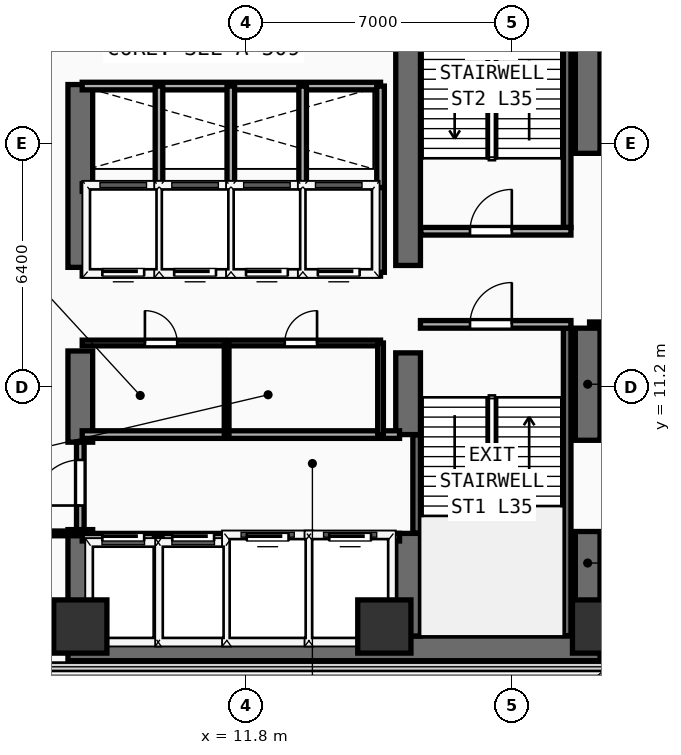
"""IFC4 building model, lengths in metres.
Left out: names, types, materials, properties, quantities, classifications, styles, units other than length and angle.
Written with IfcOpenShell. Run it as: python <this file> out.ifc"""

import sys

from ifc_helpers import new_model, si_unit, direction, frame, frame_2d, origin, origin_2d, place, context, subcontext, project, spatial, rectangle, extrude, element, fill, save


model = new_model("IFC4")
c1 = context("Model", 3, precision=1e-05, world=origin(), true_north=direction((0.0, 1.0)))
c2 = subcontext(c1, "Body", "Model", "MODEL_VIEW")
j1 = project(units=[si_unit("LENGTHUNIT", "METRE"), si_unit("PLANEANGLEUNIT", "RADIAN")], contexts=[c1])
p1 = place(None, origin())
s1 = spatial("IfcSite", under=j1, at=p1, CompositionType="ELEMENT")
p2 = place(p1, origin())
s2 = spatial("IfcBuilding", under=s1, at=p2, CompositionType="ELEMENT")
p3 = place(p2, frame((0.0, 0.0, 137.3)))
s3 = spatial("IfcBuildingStorey", under=s2, at=p3, CompositionType="ELEMENT", Elevation=137.3)
p4 = place(p3, frame((7.125, 4.325, 0.0), z_axis=(0.0, 0.0, 1.0), x_axis=(1.0, 0.0, 0.0)))
e1 = element("IfcWall", 1, at=p4, inside=s3, PredefinedType="SHEAR", context=c2, shape_type="SweptSolid", body=[
    extrude(rectangle(XDim=14.0, YDim=0.65, at=frame_2d((7.0, 0.0))), origin(), (0.0, 0.0, 1.0), 3.42),
])
p5 = place(p3, frame((7.45, 4.65, 0.0), z_axis=(0.0, 0.0, 1.0), x_axis=(0.0, 1.0, 0.0)))
e2 = element("IfcWall", 2, at=p5, inside=s3, PredefinedType="SHEAR", context=c2, shape_type="SweptSolid", body=[
    extrude(rectangle(XDim=2.8, YDim=0.65, at=frame_2d((1.4, 0.0))), origin(), (0.0, 0.0, 1.0), 3.42),
])
p6 = place(p3, frame((7.45, 9.75, 0.0), z_axis=(0.0, 0.0, 1.0), x_axis=(0.0, 1.0, 0.0)))
e3 = element("IfcWall", 3, at=p6, inside=s3, PredefinedType="SHEAR", context=c2, shape_type="SweptSolid", body=[
    extrude(rectangle(XDim=2.4, YDim=0.65, at=frame_2d((1.2, 0.0))), origin(), (0.0, 0.0, 1.0), 3.42),
])
p7 = place(p3, frame((7.45, 14.35, 0.0), z_axis=(0.0, 0.0, 1.0), x_axis=(0.0, 1.0, 0.0)))
e4 = element("IfcWall", 4, at=p7, inside=s3, PredefinedType="SHEAR", context=c2, shape_type="SweptSolid", body=[
    extrude(rectangle(XDim=4.81, YDim=0.65, at=frame_2d((2.405, 0.0))), origin(), (0.0, 0.0, 1.0), 3.42),
])
p8 = place(p3, frame((20.8, 4.65, 0.0), z_axis=(0.0, 0.0, 1.0), x_axis=(0.0, 1.0, 0.0)))
e5 = element("IfcWall", 5, at=p8, inside=s3, PredefinedType="SHEAR", context=c2, shape_type="SweptSolid", body=[
    extrude(rectangle(XDim=2.75, YDim=0.65, at=frame_2d((1.375, 0.0))), origin(), (0.0, 0.0, 1.0), 3.42),
])
p9 = place(p3, frame((20.8, 9.8, 0.0), z_axis=(0.0, 0.0, 1.0), x_axis=(0.0, 1.0, 0.0)))
e6 = element("IfcWall", 6, at=p9, inside=s3, PredefinedType="SHEAR", context=c2, shape_type="SweptSolid", body=[
    extrude(rectangle(XDim=2.95, YDim=0.65, at=frame_2d((1.475, 0.0))), origin(), (0.0, 0.0, 1.0), 3.42),
])
p10 = place(p3, frame((20.8, 17.35, 0.0), z_axis=(0.0, 0.0, 1.0), x_axis=(0.0, 1.0, 0.0)))
e7 = element("IfcWall", 7, at=p10, inside=s3, PredefinedType="SHEAR", context=c2, shape_type="SweptSolid", body=[
    extrude(rectangle(XDim=6.15, YDim=0.65, at=frame_2d((3.075, 0.0))), origin(), (0.0, 0.0, 1.0), 3.42),
])
p11 = place(p3, frame((16.075, 4.65, 0.0), z_axis=(0.0, 0.0, 1.0), x_axis=(0.0, 1.0, 0.0)))
e8 = element("IfcWall", 8, at=p11, inside=s3, PredefinedType="SHEAR", context=c2, shape_type="SweptSolid", body=[
    extrude(rectangle(XDim=2.7, YDim=0.65, at=frame_2d((1.35, 0.0))), origin(), (0.0, 0.0, 1.0), 3.42),
])
p12 = place(p3, frame((16.075, 9.95, 0.0), z_axis=(0.0, 0.0, 1.0), x_axis=(0.0, 1.0, 0.0)))
e9 = element("IfcWall", 9, at=p12, inside=s3, PredefinedType="SHEAR", context=c2, shape_type="SweptSolid", body=[
    extrude(rectangle(XDim=2.15, YDim=0.65, at=frame_2d((1.075, 0.0))), origin(), (0.0, 0.0, 1.0), 3.42),
])
p13 = place(p3, frame((16.075, 14.4, 0.0), z_axis=(0.0, 0.0, 1.0), x_axis=(0.0, 1.0, 0.0)))
e10 = element("IfcWall", 10, at=p13, inside=s3, PredefinedType="SHEAR", context=c2, shape_type="SweptSolid", body=[
    extrude(rectangle(XDim=9.1, YDim=0.65, at=frame_2d((4.55, 0.0))), origin(), (0.0, 0.0, 1.0), 3.42),
])
for number, where, z_axis, x_axis in (
    (11, (7.45, 4.9, 0.0), (0.0, 0.0, 1.0), (1.0, 0.0, 0.0)),
    (12, (15.45, 4.9, 0.0), (0.0, 0.0, 1.0), (1.0, 0.0, 0.0)),
    (13, (21.1, 4.9, 0.0), (0.0, 0.0, 1.0), (1.0, 0.0, 0.0)),
):
    element("IfcColumn", number, at=place(p3, frame(where, z_axis=z_axis, x_axis=x_axis)), inside=s3, PredefinedType="COLUMN", context=c2, shape_type="SweptSolid", body=[
        extrude(rectangle(XDim=1.4, YDim=1.4, at=origin_2d()), origin(), (0.0, 0.0, 1.0), 3.42),
    ])
p14 = place(p3, frame((16.3, 7.36, 0.0), z_axis=(0.0, 0.0, 1.0), x_axis=(0.0, 1.0, 0.0)))
e14 = element("IfcWall", 14, at=p14, inside=s3, PredefinedType="SHEAR", context=c2, shape_type="SweptSolid", body=[
    extrude(rectangle(XDim=2.58, YDim=0.2, at=frame_2d((1.29, 0.0))), origin(), (0.0, 0.0, 1.0), 3.42),
])
p15 = place(p3, frame((20.26, 4.66, 0.0), z_axis=(0.0, 0.0, 1.0), x_axis=(0.0, 1.0, 0.0)))
e15 = element("IfcWall", 15, at=p15, inside=s3, PredefinedType="SHEAR", context=c2, shape_type="SweptSolid", body=[
    extrude(rectangle(XDim=8.09, YDim=0.2, at=frame_2d((4.045, 0.0))), origin(), (0.0, 0.0, 1.0), 3.42),
])
p16 = place(p3, frame((16.4, 12.85, 0.0), z_axis=(0.0, 0.0, 1.0), x_axis=(1.0, 0.0, 0.0)))
e16 = element("IfcWall", 16, at=p16, inside=s3, PredefinedType="PARTITIONING", context=c2, shape_type="SweptSolid", body=[
    extrude(rectangle(XDim=3.96, YDim=0.2, at=frame_2d((1.98, 0.0))), origin(), (0.0, 0.0, 1.0), 3.42),
])
p17 = place(p16, frame((1.304, 0.0, 0.0)))
e17 = element("IfcOpeningElement", 17, at=p17, cuts=e16, PredefinedType="OPENING", context=c2, shape_type="SweptSolid", body=[
    extrude(rectangle(XDim=1.1, YDim=2.2, at=frame_2d((0.55, 1.1))), frame((0.0, 0.11, 0.0), z_axis=(0.0, -1.0, 0.0), x_axis=(1.0, 0.0, 0.0)), (0.0, 0.0, 1.0), 0.22),
])
p18 = place(p3, frame((20.26, 15.4, 0.0), z_axis=(0.0, 0.0, 1.0), x_axis=(0.0, 1.0, 0.0)))
e18 = element("IfcWall", 18, at=p18, inside=s3, PredefinedType="SHEAR", context=c2, shape_type="SweptSolid", body=[
    extrude(rectangle(XDim=8.09, YDim=0.2, at=frame_2d((4.045, 0.0))), origin(), (0.0, 0.0, 1.0), 3.42),
])
p19 = place(p3, frame((16.41, 15.3, 0.0), z_axis=(0.0, 0.0, 1.0), x_axis=(1.0, 0.0, 0.0)))
e19 = element("IfcWall", 19, at=p19, inside=s3, PredefinedType="PARTITIONING", context=c2, shape_type="SweptSolid", body=[
    extrude(rectangle(XDim=3.95, YDim=0.2, at=frame_2d((1.975, 0.0))), origin(), (0.0, 0.0, 1.0), 3.42),
])
p20 = place(p19, frame((1.294, 0.0, 0.0)))
e20 = element("IfcOpeningElement", 20, at=p20, cuts=e19, PredefinedType="OPENING", context=c2, shape_type="SweptSolid", body=[
    extrude(rectangle(XDim=1.1, YDim=2.2, at=frame_2d((0.55, 1.1))), frame((0.0, 0.11, 0.0), z_axis=(0.0, -1.0, 0.0), x_axis=(1.0, 0.0, 0.0)), (0.0, 0.0, 1.0), 0.22),
])
p21 = place(p3, frame((7.5, 7.25, 0.0), z_axis=(0.0, 0.0, 1.0), x_axis=(1.0, 0.0, 0.0)))
e21 = element("IfcWall", 21, at=p21, inside=s3, PredefinedType="PARTITIONING", context=c2, shape_type="SweptSolid", body=[
    extrude(rectangle(XDim=8.35, YDim=0.2, at=frame_2d((4.175, 0.0))), origin(), (0.0, 0.0, 1.0), 3.42),
])
p22 = place(p21, frame((0.53, 0.0, 0.0)))
e22 = element("IfcOpeningElement", 22, at=p22, cuts=e21, PredefinedType="OPENING", context=c2, shape_type="SweptSolid", body=[
    extrude(rectangle(XDim=1.1, YDim=2.2, at=frame_2d((0.55, 1.1))), frame((0.0, 0.11, 0.0), z_axis=(0.0, -1.0, 0.0), x_axis=(1.0, 0.0, 0.0)), (0.0, 0.0, 1.0), 0.22),
])
p23 = place(p21, frame((2.37, 0.0, 0.0)))
e23 = element("IfcOpeningElement", 23, at=p23, cuts=e21, PredefinedType="OPENING", context=c2, shape_type="SweptSolid", body=[
    extrude(rectangle(XDim=1.1, YDim=2.2, at=frame_2d((0.55, 1.1))), frame((0.0, 0.11, 0.0), z_axis=(0.0, -1.0, 0.0), x_axis=(1.0, 0.0, 0.0)), (0.0, 0.0, 1.0), 0.22),
])
p24 = place(p21, frame((4.33, 0.0, 0.0)))
e24 = element("IfcOpeningElement", 24, at=p24, cuts=e21, PredefinedType="OPENING", context=c2, shape_type="SweptSolid", body=[
    extrude(rectangle(XDim=1.1, YDim=2.2, at=frame_2d((0.55, 1.1))), frame((0.0, 0.11, 0.0), z_axis=(0.0, -1.0, 0.0), x_axis=(1.0, 0.0, 0.0)), (0.0, 0.0, 1.0), 0.22),
])
p25 = place(p21, frame((6.5, 0.0, 0.0)))
e25 = element("IfcOpeningElement", 25, at=p25, cuts=e21, PredefinedType="OPENING", context=c2, shape_type="SweptSolid", body=[
    extrude(rectangle(XDim=1.1, YDim=2.2, at=frame_2d((0.55, 1.1))), frame((0.0, 0.11, 0.0), z_axis=(0.0, -1.0, 0.0), x_axis=(1.0, 0.0, 0.0)), (0.0, 0.0, 1.0), 0.22),
])
p26 = place(p3, frame((7.5, 9.95, 0.0), z_axis=(0.0, 0.0, 1.0), x_axis=(1.0, 0.0, 0.0)))
e26 = element("IfcWall", 26, at=p26, inside=s3, PredefinedType="PARTITIONING", context=c2, shape_type="SweptSolid", body=[
    extrude(rectangle(XDim=8.35, YDim=0.2, at=frame_2d((4.175, 0.0))), origin(), (0.0, 0.0, 1.0), 3.42),
])
for number, where, z_axis, x_axis in (
    (27, (9.5, 4.45, 0.0), (0.0, 0.0, 1.0), (0.0, 1.0, 0.0)),
    (28, (11.36, 4.45, 0.0), (0.0, 0.0, 1.0), (0.0, 1.0, 0.0)),
    (29, (13.46, 4.45, 0.0), (0.0, 0.0, 1.0), (0.0, 1.0, 0.0)),
):
    element("IfcWall", number, at=place(p3, frame(where, z_axis=z_axis, x_axis=x_axis)), inside=s3, PredefinedType="PARTITIONING", context=c2, shape_type="SweptSolid", body=[
        extrude(rectangle(XDim=2.8, YDim=0.2, at=frame_2d((1.4, 0.0))), origin(), (0.0, 0.0, 1.0), 3.42),
    ])
p27 = place(p3, frame((7.45, 7.45, 0.0), z_axis=(0.0, 0.0, 1.0), x_axis=(0.0, 1.0, 0.0)))
e30 = element("IfcWall", 30, at=p27, inside=s3, PredefinedType="PARTITIONING", context=c2, shape_type="SweptSolid", body=[
    extrude(rectangle(XDim=2.3, YDim=0.2, at=frame_2d((1.15, 0.0))), origin(), (0.0, 0.0, 1.0), 2.4),
])
p28 = place(p27, frame((0.633, 0.0, 0.0)))
e31 = element("IfcOpeningElement", 31, at=p28, cuts=e30, PredefinedType="OPENING", context=c2, shape_type="SweptSolid", body=[
    extrude(rectangle(XDim=1.2, YDim=2.25, at=frame_2d((0.6, 1.125))), frame((0.0, 0.11, 0.0), z_axis=(0.0, -1.0, 0.0), x_axis=(1.0, 0.0, 0.0)), (0.0, 0.0, 1.0), 0.22),
])
p29 = place(p3, frame((7.5, 12.36, 0.0), z_axis=(0.0, 0.0, 1.0), x_axis=(1.0, 0.0, 0.0)))
e32 = element("IfcWall", 32, at=p29, inside=s3, PredefinedType="PARTITIONING", context=c2, shape_type="SweptSolid", body=[
    extrude(rectangle(XDim=7.85, YDim=0.15, at=frame_2d((3.925, 0.0))), origin(), (0.0, 0.0, 1.0), 3.42),
])
p30 = place(p29, frame((1.65, 0.0, 0.0)))
e33 = element("IfcOpeningElement", 33, at=p30, cuts=e32, PredefinedType="OPENING", context=c2, shape_type="SweptSolid", body=[
    extrude(rectangle(XDim=0.85, YDim=2.15, at=frame_2d((0.425, 1.075))), frame((0.0, 0.085, 0.0), z_axis=(0.0, -1.0, 0.0), x_axis=(1.0, 0.0, 0.0)), (0.0, 0.0, 1.0), 0.17),
])
p31 = place(p29, frame((5.329, 0.0, 0.0)))
e34 = element("IfcOpeningElement", 34, at=p31, cuts=e32, PredefinedType="OPENING", context=c2, shape_type="SweptSolid", body=[
    extrude(rectangle(XDim=0.85, YDim=2.15, at=frame_2d((0.425, 1.075))), frame((0.0, 0.085, 0.0), z_axis=(0.0, -1.0, 0.0), x_axis=(1.0, 0.0, 0.0)), (0.0, 0.0, 1.0), 0.17),
])
p32 = place(p3, frame((15.35, 9.95, 0.0), z_axis=(0.0, 0.0, 1.0), x_axis=(0.0, 1.0, 0.0)))
e35 = element("IfcWall", 35, at=p32, inside=s3, PredefinedType="PARTITIONING", context=c2, shape_type="SweptSolid", body=[
    extrude(rectangle(XDim=2.41, YDim=0.15, at=frame_2d((1.205, 0.0))), origin(), (0.0, 0.0, 1.0), 3.42),
])
p33 = place(p3, frame((11.3, 9.95, 0.0), z_axis=(0.0, 0.0, 1.0), x_axis=(0.0, 1.0, 0.0)))
e36 = element("IfcWall", 36, at=p33, inside=s3, PredefinedType="PARTITIONING", context=c2, shape_type="SweptSolid", body=[
    extrude(rectangle(XDim=2.41, YDim=0.125, at=frame_2d((1.205, 0.0))), origin(), (0.0, 0.0, 1.0), 3.42),
])
p34 = place(p3, frame((7.5, 14.22, 0.0), z_axis=(0.0, 0.0, 1.0), x_axis=(1.0, 0.0, 0.0)))
e37 = element("IfcWall", 37, at=p34, inside=s3, PredefinedType="PARTITIONING", context=c2, shape_type="SweptSolid", body=[
    extrude(rectangle(XDim=7.85, YDim=0.2, at=frame_2d((3.925, 0.0))), origin(), (0.0, 0.0, 1.0), 3.42),
])
p35 = place(p34, frame((0.53, 0.0, 0.0)))
e38 = element("IfcOpeningElement", 38, at=p35, cuts=e37, PredefinedType="OPENING", context=c2, shape_type="SweptSolid", body=[
    extrude(rectangle(XDim=1.1, YDim=2.2, at=frame_2d((0.55, 1.1))), frame((0.0, 0.11, 0.0), z_axis=(0.0, -1.0, 0.0), x_axis=(1.0, 0.0, 0.0)), (0.0, 0.0, 1.0), 0.22),
])
p36 = place(p34, frame((2.42, 0.0, 0.0)))
e39 = element("IfcOpeningElement", 39, at=p36, cuts=e37, PredefinedType="OPENING", context=c2, shape_type="SweptSolid", body=[
    extrude(rectangle(XDim=1.1, YDim=2.2, at=frame_2d((0.55, 1.1))), frame((0.0, 0.11, 0.0), z_axis=(0.0, -1.0, 0.0), x_axis=(1.0, 0.0, 0.0)), (0.0, 0.0, 1.0), 0.22),
])
p37 = place(p34, frame((4.31, 0.0, 0.0)))
e40 = element("IfcOpeningElement", 40, at=p37, cuts=e37, PredefinedType="OPENING", context=c2, shape_type="SweptSolid", body=[
    extrude(rectangle(XDim=1.1, YDim=2.2, at=frame_2d((0.55, 1.1))), frame((0.0, 0.11, 0.0), z_axis=(0.0, -1.0, 0.0), x_axis=(1.0, 0.0, 0.0)), (0.0, 0.0, 1.0), 0.22),
])
p38 = place(p34, frame((6.2, 0.0, 0.0)))
e41 = element("IfcOpeningElement", 41, at=p38, cuts=e37, PredefinedType="OPENING", context=c2, shape_type="SweptSolid", body=[
    extrude(rectangle(XDim=1.1, YDim=2.2, at=frame_2d((0.55, 1.1))), frame((0.0, 0.11, 0.0), z_axis=(0.0, -1.0, 0.0), x_axis=(1.0, 0.0, 0.0)), (0.0, 0.0, 1.0), 0.22),
])
p39 = place(p3, frame((7.5, 16.45, 0.0), z_axis=(0.0, 0.0, 1.0), x_axis=(1.0, 0.0, 0.0)))
e42 = element("IfcWall", 42, at=p39, inside=s3, PredefinedType="PARTITIONING", context=c2, shape_type="SweptSolid", body=[
    extrude(rectangle(XDim=7.85, YDim=0.2, at=frame_2d((3.925, 0.0))), origin(), (0.0, 0.0, 1.0), 3.42),
])
for number, where, z_axis, x_axis in (
    (43, (15.35, 14.22, 0.0), (0.0, 0.0, 1.0), (0.0, 1.0, 0.0)),
    (44, (9.52, 14.22, 0.0), (0.0, 0.0, 1.0), (0.0, 1.0, 0.0)),
    (45, (11.41, 14.22, 0.0), (0.0, 0.0, 1.0), (0.0, 1.0, 0.0)),
    (46, (13.3, 14.22, 0.0), (0.0, 0.0, 1.0), (0.0, 1.0, 0.0)),
):
    element("IfcWall", number, at=place(p3, frame(where, z_axis=z_axis, x_axis=x_axis)), inside=s3, PredefinedType="PARTITIONING", context=c2, shape_type="SweptSolid", body=[
        extrude(rectangle(XDim=2.23, YDim=0.2, at=frame_2d((1.115, 0.0))), origin(), (0.0, 0.0, 1.0), 3.42),
    ])
p40 = place(p3, frame((7.5, 19.12, 0.0), z_axis=(0.0, 0.0, 1.0), x_axis=(1.0, 0.0, 0.0)))
e47 = element("IfcWall", 47, at=p40, inside=s3, PredefinedType="PARTITIONING", context=c2, shape_type="SweptSolid", body=[
    extrude(rectangle(XDim=7.85, YDim=0.2, at=frame_2d((3.925, 0.0))), origin(), (0.0, 0.0, 1.0), 3.42),
])
for number, where, z_axis, x_axis in (
    (48, (15.35, 16.45, 0.0), (0.0, 0.0, 1.0), (0.0, 1.0, 0.0)),
    (49, (9.52, 16.45, 0.0), (0.0, 0.0, 1.0), (0.0, 1.0, 0.0)),
    (50, (11.41, 16.45, 0.0), (0.0, 0.0, 1.0), (0.0, 1.0, 0.0)),
    (51, (13.3, 16.45, 0.0), (0.0, 0.0, 1.0), (0.0, 1.0, 0.0)),
):
    element("IfcWall", number, at=place(p3, frame(where, z_axis=z_axis, x_axis=x_axis)), inside=s3, PredefinedType="PARTITIONING", context=c2, shape_type="SweptSolid", body=[
        extrude(rectangle(XDim=2.67, YDim=0.2, at=frame_2d((1.335, 0.0))), origin(), (0.0, 0.0, 1.0), 3.42),
    ])
p41 = place(p3, frame((1.64, 7.35, 0.0), z_axis=(0.0, 0.0, 1.0), x_axis=(1.0, 0.0, 0.0)))
e52 = element("IfcWall", 52, at=p41, inside=s3, PredefinedType="PARTITIONING", context=c2, shape_type="SweptSolid", body=[
    extrude(rectangle(XDim=5.76, YDim=0.125, at=frame_2d((2.88, 0.0))), origin(), (0.0, 0.0, 1.0), 3.42),
])
p42 = place(p41, frame((4.087, 0.0, 0.0)))
e53 = element("IfcOpeningElement", 53, at=p42, cuts=e52, PredefinedType="OPENING", context=c2, shape_type="SweptSolid", body=[
    extrude(rectangle(XDim=0.85, YDim=2.15, at=frame_2d((0.425, 1.075))), frame((0.0, 0.073, 0.0), z_axis=(0.0, -1.0, 0.0), x_axis=(1.0, 0.0, 0.0)), (0.0, 0.0, 1.0), 0.145),
])
p43 = place(p3, frame((20.85, 12.85, 0.0), z_axis=(0.0, 0.0, 1.0), x_axis=(1.0, 0.0, 0.0)))
e54 = element("IfcWall", 54, at=p43, inside=s3, PredefinedType="PARTITIONING", context=c2, shape_type="SweptSolid", body=[
    extrude(rectangle(XDim=7.05, YDim=0.125, at=frame_2d((3.525, 0.0))), origin(), (0.0, 0.0, 1.0), 3.42),
])
p44 = place(p43, frame((2.8, 0.0, 0.0)))
e55 = element("IfcOpeningElement", 55, at=p44, cuts=e54, PredefinedType="OPENING", context=c2, shape_type="SweptSolid", body=[
    extrude(rectangle(XDim=0.95, YDim=2.15, at=frame_2d((0.475, 1.075))), frame((0.0, 0.073, 0.0), z_axis=(0.0, -1.0, 0.0), x_axis=(1.0, 0.0, 0.0)), (0.0, 0.0, 1.0), 0.145),
])
p45 = place(p17, frame((1.1, 0.0, 0.0), z_axis=(0.0, 0.0, 1.0), x_axis=(-1.0, 0.0, 0.0)))
e56 = element("IfcDoor", 56, at=p45, inside=s3, OperationType="SINGLE_SWING_LEFT", PredefinedType="DOOR", context=c2, shape_type="SweptSolid", body=[
    extrude(rectangle(XDim=1.1, YDim=2.2, at=frame_2d((0.55, 1.1))), frame((0.0, 0.025, 0.0), z_axis=(0.0, -1.0, 0.0), x_axis=(1.0, 0.0, 0.0)), (0.0, 0.0, 1.0), 0.05),
])
fill(e17, e56)
p46 = place(p20, origin())
e57 = element("IfcDoor", 57, at=p46, inside=s3, OperationType="SINGLE_SWING_RIGHT", PredefinedType="DOOR", context=c2, shape_type="SweptSolid", body=[
    extrude(rectangle(XDim=1.1, YDim=2.2, at=frame_2d((0.55, 1.1))), frame((0.0, 0.025, 0.0), z_axis=(0.0, -1.0, 0.0), x_axis=(1.0, 0.0, 0.0)), (0.0, 0.0, 1.0), 0.05),
])
fill(e20, e57)
p47 = place(p22, origin())
e58 = element("IfcDoor", 58, at=p47, inside=s3, OperationType="SLIDING_TO_LEFT", PredefinedType="DOOR", context=c2, shape_type="SweptSolid", body=[
    extrude(rectangle(XDim=1.1, YDim=2.2, at=frame_2d((0.55, 1.1))), frame((0.0, 0.025, 0.0), z_axis=(0.0, -1.0, 0.0), x_axis=(1.0, 0.0, 0.0)), (0.0, 0.0, 1.0), 0.05),
])
fill(e22, e58)
p48 = place(p23, origin())
e59 = element("IfcDoor", 59, at=p48, inside=s3, OperationType="SLIDING_TO_LEFT", PredefinedType="DOOR", context=c2, shape_type="SweptSolid", body=[
    extrude(rectangle(XDim=1.1, YDim=2.2, at=frame_2d((0.55, 1.1))), frame((0.0, 0.025, 0.0), z_axis=(0.0, -1.0, 0.0), x_axis=(1.0, 0.0, 0.0)), (0.0, 0.0, 1.0), 0.05),
])
fill(e23, e59)
p49 = place(p24, origin())
e60 = element("IfcDoor", 60, at=p49, inside=s3, OperationType="SLIDING_TO_LEFT", PredefinedType="DOOR", context=c2, shape_type="SweptSolid", body=[
    extrude(rectangle(XDim=1.1, YDim=2.2, at=frame_2d((0.55, 1.1))), frame((0.0, 0.025, 0.0), z_axis=(0.0, -1.0, 0.0), x_axis=(1.0, 0.0, 0.0)), (0.0, 0.0, 1.0), 0.05),
])
fill(e24, e60)
p50 = place(p25, origin())
e61 = element("IfcDoor", 61, at=p50, inside=s3, OperationType="SLIDING_TO_LEFT", PredefinedType="DOOR", context=c2, shape_type="SweptSolid", body=[
    extrude(rectangle(XDim=1.1, YDim=2.2, at=frame_2d((0.55, 1.1))), frame((0.0, 0.025, 0.0), z_axis=(0.0, -1.0, 0.0), x_axis=(1.0, 0.0, 0.0)), (0.0, 0.0, 1.0), 0.05),
])
fill(e25, e61)
p51 = place(p28, frame((1.2, 0.0, 0.0), z_axis=(0.0, 0.0, 1.0), x_axis=(-1.0, 0.0, 0.0)))
e62 = element("IfcDoor", 62, at=p51, inside=s3, OperationType="SINGLE_SWING_RIGHT", PredefinedType="DOOR", context=c2, shape_type="SweptSolid", body=[
    extrude(rectangle(XDim=1.2, YDim=2.25, at=frame_2d((0.6, 1.125))), frame((0.0, 0.025, 0.0), z_axis=(0.0, -1.0, 0.0), x_axis=(1.0, 0.0, 0.0)), (0.0, 0.0, 1.0), 0.05),
])
fill(e31, e62)
p52 = place(p30, origin())
e63 = element("IfcDoor", 63, at=p52, inside=s3, OperationType="SINGLE_SWING_LEFT", PredefinedType="DOOR", context=c2, shape_type="SweptSolid", body=[
    extrude(rectangle(XDim=0.85, YDim=2.15, at=frame_2d((0.425, 1.075))), frame((0.0, 0.025, 0.0), z_axis=(0.0, -1.0, 0.0), x_axis=(1.0, 0.0, 0.0)), (0.0, 0.0, 1.0), 0.05),
])
fill(e33, e63)
p53 = place(p31, origin())
e64 = element("IfcDoor", 64, at=p53, inside=s3, OperationType="SINGLE_SWING_RIGHT", PredefinedType="DOOR", context=c2, shape_type="SweptSolid", body=[
    extrude(rectangle(XDim=0.85, YDim=2.15, at=frame_2d((0.425, 1.075))), frame((0.0, 0.025, 0.0), z_axis=(0.0, -1.0, 0.0), x_axis=(1.0, 0.0, 0.0)), (0.0, 0.0, 1.0), 0.05),
])
fill(e34, e64)
p54 = place(p35, frame((1.1, 0.0, 0.0), z_axis=(0.0, 0.0, 1.0), x_axis=(-1.0, 0.0, 0.0)))
e65 = element("IfcDoor", 65, at=p54, inside=s3, OperationType="SLIDING_TO_LEFT", PredefinedType="DOOR", context=c2, shape_type="SweptSolid", body=[
    extrude(rectangle(XDim=1.1, YDim=2.2, at=frame_2d((0.55, 1.1))), frame((0.0, 0.025, 0.0), z_axis=(0.0, -1.0, 0.0), x_axis=(1.0, 0.0, 0.0)), (0.0, 0.0, 1.0), 0.05),
])
fill(e38, e65)
p55 = place(p36, frame((1.1, 0.0, 0.0), z_axis=(0.0, 0.0, 1.0), x_axis=(-1.0, 0.0, 0.0)))
e66 = element("IfcDoor", 66, at=p55, inside=s3, OperationType="SLIDING_TO_LEFT", PredefinedType="DOOR", context=c2, shape_type="SweptSolid", body=[
    extrude(rectangle(XDim=1.1, YDim=2.2, at=frame_2d((0.55, 1.1))), frame((0.0, 0.025, 0.0), z_axis=(0.0, -1.0, 0.0), x_axis=(1.0, 0.0, 0.0)), (0.0, 0.0, 1.0), 0.05),
])
fill(e39, e66)
p56 = place(p37, frame((1.1, 0.0, 0.0), z_axis=(0.0, 0.0, 1.0), x_axis=(-1.0, 0.0, 0.0)))
e67 = element("IfcDoor", 67, at=p56, inside=s3, OperationType="SLIDING_TO_LEFT", PredefinedType="DOOR", context=c2, shape_type="SweptSolid", body=[
    extrude(rectangle(XDim=1.1, YDim=2.2, at=frame_2d((0.55, 1.1))), frame((0.0, 0.025, 0.0), z_axis=(0.0, -1.0, 0.0), x_axis=(1.0, 0.0, 0.0)), (0.0, 0.0, 1.0), 0.05),
])
fill(e40, e67)
p57 = place(p38, frame((1.1, 0.0, 0.0), z_axis=(0.0, 0.0, 1.0), x_axis=(-1.0, 0.0, 0.0)))
e68 = element("IfcDoor", 68, at=p57, inside=s3, OperationType="SLIDING_TO_LEFT", PredefinedType="DOOR", context=c2, shape_type="SweptSolid", body=[
    extrude(rectangle(XDim=1.1, YDim=2.2, at=frame_2d((0.55, 1.1))), frame((0.0, 0.025, 0.0), z_axis=(0.0, -1.0, 0.0), x_axis=(1.0, 0.0, 0.0)), (0.0, 0.0, 1.0), 0.05),
])
fill(e41, e68)
save(model, sys.argv[1])
